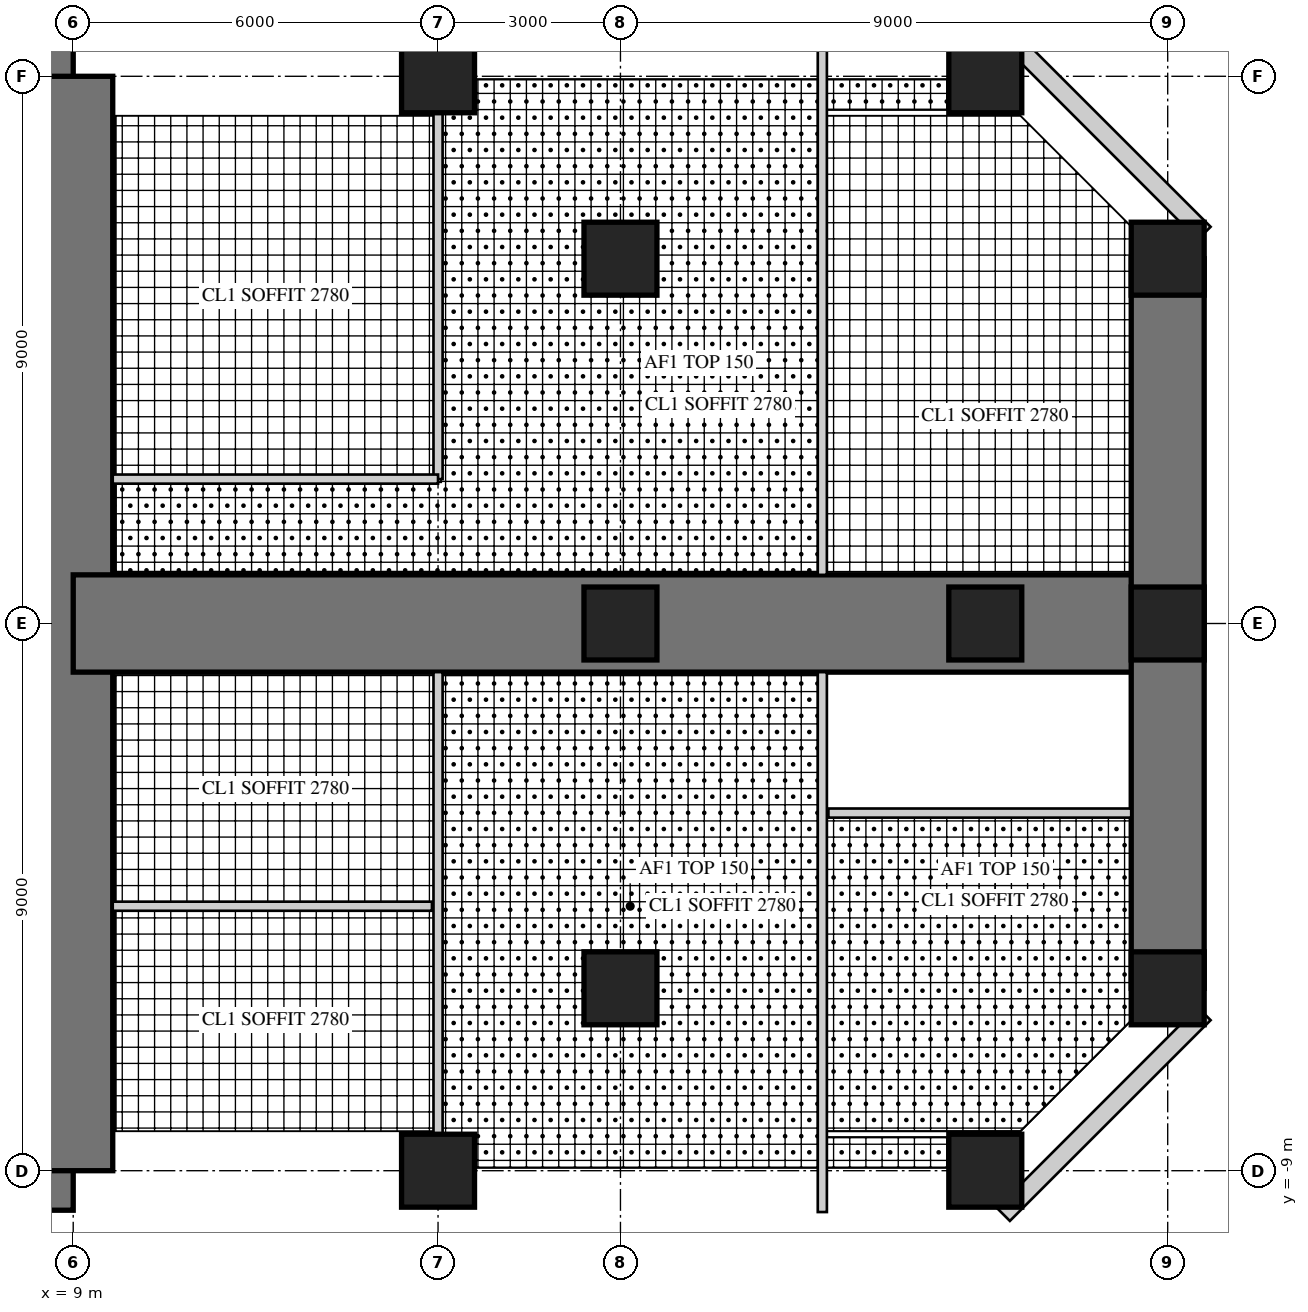
"""IFC4 building model, lengths in metres.
Left out: names, types, materials, properties, quantities, classifications, styles, units other than length and angle.
Written with IfcOpenShell. Run it as: python <this file> out.ifc"""

import sys

from ifc_helpers import new_model, si_unit, direction, frame, frame_2d, origin, origin_2d, place, context, subcontext, project, spatial, rectangle, hollow_rectangle, extrude, element, fill, save


model = new_model("IFC4")
c1 = context("Model", 3, precision=1e-05, world=origin(), true_north=direction((0.0, 1.0)))
c2 = subcontext(c1, "Body", "Model", "MODEL_VIEW")
j1 = project(units=[si_unit("LENGTHUNIT", "METRE"), si_unit("PLANEANGLEUNIT", "RADIAN")], contexts=[c1])
p1 = place(None, origin())
s1 = spatial("IfcSite", under=j1, at=p1, CompositionType="ELEMENT")
p2 = place(p1, origin())
s2 = spatial("IfcBuilding", under=s1, at=p2, CompositionType="ELEMENT")
p3 = place(p2, frame((0.0, 0.0, 27.5)))
s3 = spatial("IfcBuildingStorey", under=s2, at=p3, CompositionType="ELEMENT", Elevation=27.5)
p4 = place(p3, frame((9.0, 9.0, 0.0), z_axis=(0.0, 0.0, 1.0), x_axis=(-1.0, 0.0, 0.0)))
e1 = element("IfcWall", 1, at=p4, inside=s3, PredefinedType="SHEAR", context=c2, shape_type="SweptSolid", body=[
    extrude(rectangle(XDim=18.0, YDim=1.3, at=frame_2d((9.0, 0.0))), origin(), (0.0, 0.0, 1.0), 4.0),
])
p5 = place(p4, frame((9.8, 0.0, 0.0)))
e2 = element("IfcOpeningElement", 2, at=p5, cuts=e1, PredefinedType="OPENING", context=c2, shape_type="SweptSolid", body=[
    extrude(rectangle(XDim=1.0, YDim=2.4, at=frame_2d((0.5, 1.2))), frame((0.0, 0.66, 0.0), z_axis=(0.0, -1.0, 0.0), x_axis=(1.0, 0.0, 0.0)), (0.0, 0.0, 1.0), 1.32),
])
p6 = place(p3, frame((-9.0, -9.0, 0.0), z_axis=(0.0, 0.0, 1.0), x_axis=(1.0, 0.0, 0.0)))
e3 = element("IfcWall", 3, at=p6, inside=s3, PredefinedType="SHEAR", context=c2, shape_type="SweptSolid", body=[
    extrude(rectangle(XDim=18.0, YDim=1.3, at=frame_2d((9.0, 0.0))), origin(), (0.0, 0.0, 1.0), 4.0),
])
p7 = place(p6, frame((9.8, 0.0, 0.0)))
e4 = element("IfcOpeningElement", 4, at=p7, cuts=e3, PredefinedType="OPENING", context=c2, shape_type="SweptSolid", body=[
    extrude(rectangle(XDim=1.0, YDim=2.4, at=frame_2d((0.5, 1.2))), frame((0.0, 0.66, 0.0), z_axis=(0.0, -1.0, 0.0), x_axis=(1.0, 0.0, 0.0)), (0.0, 0.0, 1.0), 1.32),
])
p8 = place(p3, frame((9.0, -9.0, 0.0), z_axis=(0.0, 0.0, 1.0), x_axis=(0.0, 1.0, 0.0)))
e5 = element("IfcWall", 5, at=p8, inside=s3, PredefinedType="SHEAR", context=c2, shape_type="SweptSolid", body=[
    extrude(rectangle(XDim=18.0, YDim=1.3, at=frame_2d((9.0, 0.0))), origin(), (0.0, 0.0, 1.0), 4.0),
])
p9 = place(p8, frame((9.8, 0.0, 0.0)))
e6 = element("IfcOpeningElement", 6, at=p9, cuts=e5, PredefinedType="OPENING", context=c2, shape_type="SweptSolid", body=[
    extrude(rectangle(XDim=1.0, YDim=2.4, at=frame_2d((0.5, 1.2))), frame((0.0, 0.66, 0.0), z_axis=(0.0, -1.0, 0.0), x_axis=(1.0, 0.0, 0.0)), (0.0, 0.0, 1.0), 1.32),
])
p10 = place(p3, frame((9.0, 0.0, 0.0), z_axis=(0.0, 0.0, 1.0), x_axis=(1.0, 0.0, 0.0)))
e7 = element("IfcWall", 7, at=p10, inside=s3, PredefinedType="SHEAR", context=c2, shape_type="SweptSolid", body=[
    extrude(rectangle(XDim=18.0, YDim=1.6, at=frame_2d((9.0, 0.0))), origin(), (0.0, 0.0, 1.0), 4.0),
])
p11 = place(p10, frame((9.9, 0.0, 0.0)))
e8 = element("IfcOpeningElement", 8, at=p11, cuts=e7, PredefinedType="OPENING", context=c2, shape_type="SweptSolid", body=[
    extrude(rectangle(XDim=1.0, YDim=2.2, at=frame_2d((0.5, 1.1))), frame((0.0, 0.81, 0.0), z_axis=(0.0, -1.0, 0.0), x_axis=(1.0, 0.0, 0.0)), (0.0, 0.0, 1.0), 1.62),
])
p12 = place(p3, frame((27.0, -6.0, 0.0), z_axis=(0.0, 0.0, 1.0), x_axis=(0.0, 1.0, 0.0)))
e9 = element("IfcWall", 9, at=p12, inside=s3, PredefinedType="SHEAR", context=c2, shape_type="SweptSolid", body=[
    extrude(rectangle(XDim=12.0, YDim=1.2, at=frame_2d((6.0, 0.0))), origin(), (0.0, 0.0, 1.0), 4.0),
])
p13 = place(p12, frame((1.5, 0.0, 0.6)))
e10 = element("IfcOpeningElement", 10, at=p13, cuts=e9, PredefinedType="OPENING", context=c2, shape_type="SweptSolid", body=[
    extrude(rectangle(XDim=3.0, YDim=2.4, at=frame_2d((1.5, 1.2))), frame((0.0, 0.61, 0.0), z_axis=(0.0, -1.0, 0.0), x_axis=(1.0, 0.0, 0.0)), (0.0, 0.0, 1.0), 1.22),
])
p14 = place(p12, frame((7.5, 0.0, 0.6)))
e11 = element("IfcOpeningElement", 11, at=p14, cuts=e9, PredefinedType="OPENING", context=c2, shape_type="SweptSolid", body=[
    extrude(rectangle(XDim=3.0, YDim=2.4, at=frame_2d((1.5, 1.2))), frame((0.0, 0.61, 0.0), z_axis=(0.0, -1.0, 0.0), x_axis=(1.0, 0.0, 0.0)), (0.0, 0.0, 1.0), 1.22),
])
for number, where, z_axis, x_axis in (
    (12, (15.0, -9.0, 0.0), (0.0, 0.0, 1.0), (1.0, 0.0, 0.0)),
    (13, (24.0, -9.0, 0.0), (0.0, 0.0, 1.0), (1.0, 0.0, 0.0)),
    (14, (15.0, 9.0, 0.0), (0.0, 0.0, 1.0), (1.0, 0.0, 0.0)),
    (15, (24.0, 9.0, 0.0), (0.0, 0.0, 1.0), (1.0, 0.0, 0.0)),
    (16, (27.0, -6.0, 0.0), (0.0, 0.0, 1.0), (1.0, 0.0, 0.0)),
    (17, (27.0, 0.0, 0.0), (0.0, 0.0, 1.0), (1.0, 0.0, 0.0)),
    (18, (27.0, 6.0, 0.0), (0.0, 0.0, 1.0), (1.0, 0.0, 0.0)),
    (19, (18.0, -6.0, 0.0), (0.0, 0.0, 1.0), (1.0, 0.0, 0.0)),
    (20, (18.0, 0.0, 0.0), (0.0, 0.0, 1.0), (1.0, 0.0, 0.0)),
    (21, (18.0, 6.0, 0.0), (0.0, 0.0, 1.0), (1.0, 0.0, 0.0)),
    (22, (24.0, 0.0, 0.0), (0.0, 0.0, 1.0), (1.0, 0.0, 0.0)),
):
    element("IfcColumn", number, at=place(p3, frame(where, z_axis=z_axis, x_axis=x_axis)), inside=s3, PredefinedType="COLUMN", context=c2, shape_type="SweptSolid", body=[
        extrude(rectangle(XDim=1.2, YDim=1.2, at=origin_2d()), origin(), (0.0, 0.0, 1.0), 4.0),
    ])
p15 = place(p3, frame((24.298, -9.72, 0.0), z_axis=(0.0, 0.0, 1.0), x_axis=(0.707106781187, 0.707106781187, 0.0)))
e23 = element("IfcWall", 23, at=p15, inside=s3, PredefinedType="SOLIDWALL", context=c2, shape_type="SweptSolid", body=[
    extrude(rectangle(XDim=4.669, YDim=0.3, at=frame_2d((2.335, 0.0))), origin(), (0.0, 0.0, 1.0), 3.8),
])
p16 = place(p15, frame((1.885, 0.0, 0.3)))
e24 = element("IfcOpeningElement", 24, at=p16, cuts=e23, PredefinedType="OPENING", context=c2, shape_type="SweptSolid", body=[
    extrude(rectangle(XDim=0.9, YDim=2.4, at=frame_2d((0.45, 1.2))), frame((0.0, 0.16, 0.0), z_axis=(0.0, -1.0, 0.0), x_axis=(1.0, 0.0, 0.0)), (0.0, 0.0, 1.0), 0.32),
])
p17 = place(p3, frame((27.6, 6.418, 0.0), z_axis=(0.0, 0.0, 1.0), x_axis=(-0.707106781187, 0.707106781187, 0.0)))
e25 = element("IfcWall", 25, at=p17, inside=s3, PredefinedType="SOLIDWALL", context=c2, shape_type="SweptSolid", body=[
    extrude(rectangle(XDim=4.669, YDim=0.3, at=frame_2d((2.335, 0.0))), origin(), (0.0, 0.0, 1.0), 3.8),
])
p18 = place(p17, frame((1.885, 0.0, 0.3)))
e26 = element("IfcOpeningElement", 26, at=p18, cuts=e25, PredefinedType="OPENING", context=c2, shape_type="SweptSolid", body=[
    extrude(rectangle(XDim=0.9, YDim=2.4, at=frame_2d((0.45, 1.2))), frame((0.0, 0.16, 0.0), z_axis=(0.0, -1.0, 0.0), x_axis=(1.0, 0.0, 0.0)), (0.0, 0.0, 1.0), 0.32),
])
p19 = place(p3, frame((15.0, 2.375, 0.0), z_axis=(0.0, 0.0, 1.0), x_axis=(0.0, 1.0, 0.0)))
e27 = element("IfcWall", 27, at=p19, inside=s3, PredefinedType="PARTITIONING", context=c2, shape_type="SweptSolid", body=[
    extrude(rectangle(XDim=6.025, YDim=0.15, at=frame_2d((3.012, 0.0))), origin(), (0.0, 0.0, 1.0), 2.95),
])
p20 = place(p19, frame((2.512, 0.0, 0.0)))
e28 = element("IfcOpeningElement", 28, at=p20, cuts=e27, PredefinedType="OPENING", context=c2, shape_type="SweptSolid", body=[
    extrude(rectangle(XDim=1.0, YDim=2.1, at=frame_2d((0.5, 1.05))), frame((0.0, 0.085, 0.0), z_axis=(0.0, -1.0, 0.0), x_axis=(1.0, 0.0, 0.0)), (0.0, 0.0, 1.0), 0.17),
])
p21 = place(p3, frame((9.65, 2.375, 0.0), z_axis=(0.0, 0.0, 1.0), x_axis=(1.0, 0.0, 0.0)))
e29 = element("IfcWall", 29, at=p21, inside=s3, PredefinedType="PARTITIONING", context=c2, shape_type="SweptSolid", body=[
    extrude(rectangle(XDim=5.35, YDim=0.15, at=frame_2d((2.675, 0.0))), origin(), (0.0, 0.0, 1.0), 3.8),
])
p22 = place(p3, frame((15.0, -8.4, 0.0), z_axis=(0.0, 0.0, 1.0), x_axis=(0.0, 1.0, 0.0)))
e30 = element("IfcWall", 30, at=p22, inside=s3, PredefinedType="PARTITIONING", context=c2, shape_type="SweptSolid", body=[
    extrude(rectangle(XDim=7.6, YDim=0.15, at=frame_2d((3.8, 0.0))), origin(), (0.0, 0.0, 1.0), 2.95),
])
p23 = place(p22, frame((1.375, 0.0, 0.0)))
e31 = element("IfcOpeningElement", 31, at=p23, cuts=e30, PredefinedType="OPENING", context=c2, shape_type="SweptSolid", body=[
    extrude(rectangle(XDim=1.0, YDim=2.1, at=frame_2d((0.5, 1.05))), frame((0.0, 0.085, 0.0), z_axis=(0.0, -1.0, 0.0), x_axis=(1.0, 0.0, 0.0)), (0.0, 0.0, 1.0), 0.17),
])
p24 = place(p22, frame((5.175, 0.0, 0.0)))
e32 = element("IfcOpeningElement", 32, at=p24, cuts=e30, PredefinedType="OPENING", context=c2, shape_type="SweptSolid", body=[
    extrude(rectangle(XDim=1.0, YDim=2.1, at=frame_2d((0.5, 1.05))), frame((0.0, 0.085, 0.0), z_axis=(0.0, -1.0, 0.0), x_axis=(1.0, 0.0, 0.0)), (0.0, 0.0, 1.0), 0.17),
])
p25 = place(p3, frame((9.65, -4.65, 0.0), z_axis=(0.0, 0.0, 1.0), x_axis=(1.0, 0.0, 0.0)))
e33 = element("IfcWall", 33, at=p25, inside=s3, PredefinedType="PARTITIONING", context=c2, shape_type="SweptSolid", body=[
    extrude(rectangle(XDim=5.25, YDim=0.15, at=frame_2d((2.625, 0.0))), origin(), (0.0, 0.0, 1.0), 3.8),
])
p26 = place(p3, frame((21.32, 0.8, 0.0), z_axis=(0.0, 0.0, 1.0), x_axis=(0.0, 1.0, 0.0)))
e34 = element("IfcWall", 34, at=p26, inside=s3, PredefinedType="PARTITIONING", context=c2, shape_type="SweptSolid", body=[
    extrude(rectangle(XDim=8.88, YDim=0.15, at=frame_2d((4.44, 0.0))), origin(), (0.0, 0.0, 1.0), 3.8),
])
p27 = place(p26, frame((0.45, 0.0, 0.0)))
e35 = element("IfcOpeningElement", 35, at=p27, cuts=e34, PredefinedType="OPENING", context=c2, shape_type="SweptSolid", body=[
    extrude(rectangle(XDim=1.0, YDim=2.2, at=frame_2d((0.5, 1.1))), frame((0.0, 0.085, 0.0), z_axis=(0.0, -1.0, 0.0), x_axis=(1.0, 0.0, 0.0)), (0.0, 0.0, 1.0), 0.17),
])
p28 = place(p3, frame((21.42, -3.118, 0.0), z_axis=(0.0, 0.0, 1.0), x_axis=(1.0, 0.0, 0.0)))
e36 = element("IfcWall", 36, at=p28, inside=s3, PredefinedType="PARTITIONING", context=c2, shape_type="SweptSolid", body=[
    extrude(rectangle(XDim=4.98, YDim=0.15, at=frame_2d((2.49, 0.0))), origin(), (0.0, 0.0, 1.0), 3.8),
])
p29 = place(p3, frame((21.32, -9.68, 0.0), z_axis=(0.0, 0.0, 1.0), x_axis=(0.0, 1.0, 0.0)))
e37 = element("IfcWall", 37, at=p29, inside=s3, PredefinedType="PARTITIONING", context=c2, shape_type="SweptSolid", body=[
    extrude(rectangle(XDim=8.88, YDim=0.15, at=frame_2d((4.44, 0.0))), origin(), (0.0, 0.0, 1.0), 3.8),
])
p30 = place(p29, frame((5.087, 0.0, 0.0)))
e38 = element("IfcOpeningElement", 38, at=p30, cuts=e37, PredefinedType="OPENING", context=c2, shape_type="SweptSolid", body=[
    extrude(rectangle(XDim=1.0, YDim=2.2, at=frame_2d((0.5, 1.1))), frame((0.0, 0.085, 0.0), z_axis=(0.0, -1.0, 0.0), x_axis=(1.0, 0.0, 0.0)), (0.0, 0.0, 1.0), 0.17),
])
p31 = place(p29, frame((7.53, 0.0, 0.0)))
e39 = element("IfcOpeningElement", 39, at=p31, cuts=e37, PredefinedType="OPENING", context=c2, shape_type="SweptSolid", body=[
    extrude(rectangle(XDim=1.0, YDim=2.2, at=frame_2d((0.5, 1.1))), frame((0.0, 0.085, 0.0), z_axis=(0.0, -1.0, 0.0), x_axis=(1.0, 0.0, 0.0)), (0.0, 0.0, 1.0), 0.17),
])
p32 = place(p16, origin())
e40 = element("IfcWindow", 40, at=p32, inside=s3, PartitioningType="SINGLE_PANEL", PredefinedType="WINDOW", context=c2, shape_type="SweptSolid", body=[
    extrude(hollow_rectangle(XDim=0.9, YDim=2.4, WallThickness=0.06, at=frame_2d((0.45, 1.2))), frame((0.0, 0.03, 0.0), z_axis=(0.0, -1.0, 0.0), x_axis=(1.0, 0.0, 0.0)), (0.0, 0.0, 1.0), 0.06),
    extrude(rectangle(XDim=0.779, YDim=2.279, at=frame_2d((0.45, 1.2))), frame((0.0, 0.03, 0.0), z_axis=(0.0, -1.0, 0.0), x_axis=(1.0, 0.0, 0.0)), (0.0, 0.0, 1.0), 0.06),
])
fill(e24, e40)
p33 = place(p13, origin())
e41 = element("IfcWindow", 41, at=p33, inside=s3, PartitioningType="SINGLE_PANEL", PredefinedType="WINDOW", context=c2, shape_type="SweptSolid", body=[
    extrude(hollow_rectangle(XDim=3.0, YDim=2.4, WallThickness=0.06, at=frame_2d((1.5, 1.2))), frame((0.0, 0.03, 0.0), z_axis=(0.0, -1.0, 0.0), x_axis=(1.0, 0.0, 0.0)), (0.0, 0.0, 1.0), 0.06),
    extrude(rectangle(XDim=2.879, YDim=2.279, at=frame_2d((1.5, 1.2))), frame((0.0, 0.03, 0.0), z_axis=(0.0, -1.0, 0.0), x_axis=(1.0, 0.0, 0.0)), (0.0, 0.0, 1.0), 0.06),
])
fill(e10, e41)
p34 = place(p14, origin())
e42 = element("IfcWindow", 42, at=p34, inside=s3, PartitioningType="SINGLE_PANEL", PredefinedType="WINDOW", context=c2, shape_type="SweptSolid", body=[
    extrude(hollow_rectangle(XDim=3.0, YDim=2.4, WallThickness=0.06, at=frame_2d((1.5, 1.2))), frame((0.0, 0.03, 0.0), z_axis=(0.0, -1.0, 0.0), x_axis=(1.0, 0.0, 0.0)), (0.0, 0.0, 1.0), 0.06),
    extrude(rectangle(XDim=2.879, YDim=2.279, at=frame_2d((1.5, 1.2))), frame((0.0, 0.03, 0.0), z_axis=(0.0, -1.0, 0.0), x_axis=(1.0, 0.0, 0.0)), (0.0, 0.0, 1.0), 0.06),
])
fill(e11, e42)
p35 = place(p18, origin())
e43 = element("IfcWindow", 43, at=p35, inside=s3, PartitioningType="SINGLE_PANEL", PredefinedType="WINDOW", context=c2, shape_type="SweptSolid", body=[
    extrude(hollow_rectangle(XDim=0.9, YDim=2.4, WallThickness=0.06, at=frame_2d((0.45, 1.2))), frame((0.0, 0.03, 0.0), z_axis=(0.0, -1.0, 0.0), x_axis=(1.0, 0.0, 0.0)), (0.0, 0.0, 1.0), 0.06),
    extrude(rectangle(XDim=0.779, YDim=2.279, at=frame_2d((0.45, 1.2))), frame((0.0, 0.03, 0.0), z_axis=(0.0, -1.0, 0.0), x_axis=(1.0, 0.0, 0.0)), (0.0, 0.0, 1.0), 0.06),
])
fill(e26, e43)
p36 = place(p20, origin())
e44 = element("IfcDoor", 44, at=p36, inside=s3, OperationType="SINGLE_SWING_LEFT", PredefinedType="DOOR", context=c2, shape_type="SweptSolid", body=[
    extrude(rectangle(XDim=1.0, YDim=2.1, at=frame_2d((0.5, 1.05))), frame((0.0, 0.025, 0.0), z_axis=(0.0, -1.0, 0.0), x_axis=(1.0, 0.0, 0.0)), (0.0, 0.0, 1.0), 0.05),
])
fill(e28, e44)
p37 = place(p23, origin())
e45 = element("IfcDoor", 45, at=p37, inside=s3, OperationType="SINGLE_SWING_RIGHT", PredefinedType="DOOR", context=c2, shape_type="SweptSolid", body=[
    extrude(rectangle(XDim=1.0, YDim=2.1, at=frame_2d((0.5, 1.05))), frame((0.0, 0.025, 0.0), z_axis=(0.0, -1.0, 0.0), x_axis=(1.0, 0.0, 0.0)), (0.0, 0.0, 1.0), 0.05),
])
fill(e31, e45)
p38 = place(p24, origin())
e46 = element("IfcDoor", 46, at=p38, inside=s3, OperationType="SINGLE_SWING_LEFT", PredefinedType="DOOR", context=c2, shape_type="SweptSolid", body=[
    extrude(rectangle(XDim=1.0, YDim=2.1, at=frame_2d((0.5, 1.05))), frame((0.0, 0.025, 0.0), z_axis=(0.0, -1.0, 0.0), x_axis=(1.0, 0.0, 0.0)), (0.0, 0.0, 1.0), 0.05),
])
fill(e32, e46)
p39 = place(p27, frame((1.0, 0.0, 0.0), z_axis=(0.0, 0.0, 1.0), x_axis=(-1.0, 0.0, 0.0)))
e47 = element("IfcDoor", 47, at=p39, inside=s3, OperationType="SINGLE_SWING_RIGHT", PredefinedType="DOOR", context=c2, shape_type="SweptSolid", body=[
    extrude(rectangle(XDim=1.0, YDim=2.2, at=frame_2d((0.5, 1.1))), frame((0.0, 0.025, 0.0), z_axis=(0.0, -1.0, 0.0), x_axis=(1.0, 0.0, 0.0)), (0.0, 0.0, 1.0), 0.05),
])
fill(e35, e47)
p40 = place(p30, frame((1.0, 0.0, 0.0), z_axis=(0.0, 0.0, 1.0), x_axis=(-1.0, 0.0, 0.0)))
e48 = element("IfcDoor", 48, at=p40, inside=s3, OperationType="SINGLE_SWING_LEFT", PredefinedType="DOOR", context=c2, shape_type="SweptSolid", body=[
    extrude(rectangle(XDim=1.0, YDim=2.2, at=frame_2d((0.5, 1.1))), frame((0.0, 0.025, 0.0), z_axis=(0.0, -1.0, 0.0), x_axis=(1.0, 0.0, 0.0)), (0.0, 0.0, 1.0), 0.05),
])
fill(e38, e48)
p41 = place(p31, frame((1.0, 0.0, 0.0), z_axis=(0.0, 0.0, 1.0), x_axis=(-1.0, 0.0, 0.0)))
e49 = element("IfcDoor", 49, at=p41, inside=s3, OperationType="SINGLE_SWING_LEFT", PredefinedType="DOOR", context=c2, shape_type="SweptSolid", body=[
    extrude(rectangle(XDim=1.0, YDim=2.2, at=frame_2d((0.5, 1.1))), frame((0.0, 0.025, 0.0), z_axis=(0.0, -1.0, 0.0), x_axis=(1.0, 0.0, 0.0)), (0.0, 0.0, 1.0), 0.05),
])
fill(e39, e49)
p42 = place(p11, frame((1.0, 0.0, 0.0), z_axis=(0.0, 0.0, 1.0), x_axis=(-1.0, 0.0, 0.0)))
e50 = element("IfcDoor", 50, at=p42, inside=s3, OperationType="SINGLE_SWING_LEFT", PredefinedType="DOOR", context=c2, shape_type="SweptSolid", body=[
    extrude(rectangle(XDim=1.0, YDim=2.2, at=frame_2d((0.5, 1.1))), frame((0.0, 0.025, 0.0), z_axis=(0.0, -1.0, 0.0), x_axis=(1.0, 0.0, 0.0)), (0.0, 0.0, 1.0), 0.05),
])
fill(e8, e50)
p43 = place(p9, frame((1.0, 0.0, 0.0), z_axis=(0.0, 0.0, 1.0), x_axis=(-1.0, 0.0, 0.0)))
e51 = element("IfcDoor", 51, at=p43, inside=s3, OperationType="SINGLE_SWING_RIGHT", PredefinedType="DOOR", context=c2, shape_type="SweptSolid", body=[
    extrude(rectangle(XDim=1.0, YDim=2.4, at=frame_2d((0.5, 1.2))), frame((0.0, -0.005, 0.0), z_axis=(0.0, -1.0, 0.0), x_axis=(1.0, 0.0, 0.0)), (0.0, 0.0, 1.0), 0.05),
])
fill(e6, e51)
save(model, sys.argv[1])
